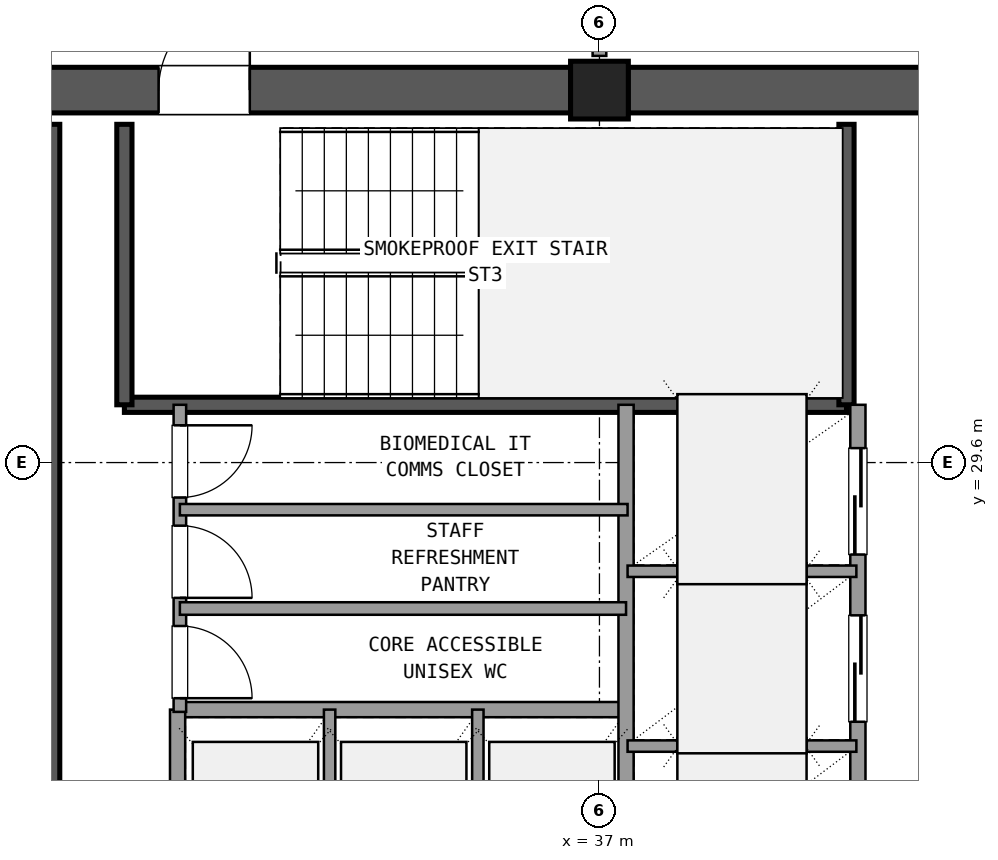
"""IFC4 building model, lengths in metres.
Left out: names, types, materials, properties, quantities, classifications, styles, units other than length and angle.
Written with IfcOpenShell. Run it as: python <this file> out.ifc"""

import sys

from ifc_helpers import new_model, si_unit, direction, frame, frame_2d, origin, origin_2d, place, context, subcontext, project, spatial, rectangle, extrude, element, fill, save


model = new_model("IFC4")
c1 = context("Model", 3, precision=1e-05, world=origin(), true_north=direction((0.0, 1.0)))
c2 = subcontext(c1, "Body", "Model", "MODEL_VIEW")
j1 = project(units=[si_unit("LENGTHUNIT", "METRE"), si_unit("PLANEANGLEUNIT", "RADIAN")], contexts=[c1])
p1 = place(None, origin())
s1 = spatial("IfcSite", under=j1, at=p1, CompositionType="ELEMENT")
p2 = place(p1, origin())
s2 = spatial("IfcBuilding", under=s1, at=p2, CompositionType="ELEMENT")
p3 = place(p2, frame((0.0, 0.0, 271.62)))
s3 = spatial("IfcBuildingStorey", under=s2, at=p3, CompositionType="ELEMENT", Elevation=271.62)
p4 = place(p3, frame((37.0, 34.5, 0.0), z_axis=(0.0, 0.0, 1.0), x_axis=(1.0, 0.0, 0.0)))
e1 = element("IfcColumn", 1, at=p4, inside=s3, PredefinedType="COLUMN", context=c2, shape_type="SweptSolid", body=[
    extrude(rectangle(XDim=0.76, YDim=0.76, at=origin_2d()), origin(), (0.0, 0.0, 1.0), 3.6),
])
p5 = place(p3, frame((47.825, 34.5, 0.0), z_axis=(0.0, 0.0, 1.0), x_axis=(-1.0, 0.0, 0.0)))
e2 = element("IfcWall", 2, at=p5, inside=s3, PredefinedType="SHEAR", context=c2, shape_type="SweptSolid", body=[
    extrude(rectangle(XDim=10.45, YDim=0.6, at=frame_2d((5.225, 0.0))), origin(), (0.0, 0.0, 1.0), 3.32),
])
p6 = place(p5, frame((4.725, 0.0, 0.0)))
e3 = element("IfcOpeningElement", 3, at=p6, cuts=e2, PredefinedType="OPENING", context=c2, shape_type="SweptSolid", body=[
    extrude(rectangle(XDim=1.6, YDim=2.2, at=frame_2d((0.8, 1.1))), frame((0.0, 0.31, 0.0), z_axis=(0.0, -1.0, 0.0), x_axis=(1.0, 0.0, 0.0)), (0.0, 0.0, 1.0), 0.62),
])
p7 = place(p3, frame((36.625, 34.5, 0.0), z_axis=(0.0, 0.0, 1.0), x_axis=(-1.0, 0.0, 0.0)))
e4 = element("IfcWall", 4, at=p7, inside=s3, PredefinedType="SHEAR", context=c2, shape_type="SweptSolid", body=[
    extrude(rectangle(XDim=10.45, YDim=0.6, at=frame_2d((5.225, 0.0))), origin(), (0.0, 0.0, 1.0), 3.32),
])
p8 = place(p7, frame((4.225, 0.0, 0.0)))
e5 = element("IfcOpeningElement", 5, at=p8, cuts=e4, PredefinedType="OPENING", context=c2, shape_type="SweptSolid", body=[
    extrude(rectangle(XDim=1.2, YDim=2.15, at=frame_2d((0.6, 1.075))), frame((0.0, 0.31, 0.0), z_axis=(0.0, -1.0, 0.0), x_axis=(1.0, 0.0, 0.0)), (0.0, 0.0, 1.0), 0.62),
])
p9 = place(p3, frame((29.8, 24.65, 0.0), z_axis=(0.0, 0.0, 1.0), x_axis=(0.0, 1.0, 0.0)))
e6 = element("IfcWall", 6, at=p9, inside=s3, PredefinedType="SHEAR", context=c2, shape_type="SweptSolid", body=[
    extrude(rectangle(XDim=9.4, YDim=0.2, at=frame_2d((4.7, 0.0))), origin(), (0.0, 0.0, 1.0), 3.32),
])
p10 = place(p3, frame((30.75, 30.36, 0.0), z_axis=(0.0, 0.0, 1.0), x_axis=(1.0, 0.0, 0.0)))
e7 = element("IfcWall", 7, at=p10, inside=s3, PredefinedType="SHEAR", context=c2, shape_type="SweptSolid", body=[
    extrude(rectangle(XDim=9.5, YDim=0.2, at=frame_2d((4.75, 0.0))), origin(), (0.0, 0.0, 1.0), 3.32),
])
for number, where, z_axis, x_axis in (
    (8, (30.75, 30.36, 0.0), (0.0, 0.0, 1.0), (0.0, 1.0, 0.0)),
    (9, (40.25, 30.36, 0.0), (0.0, 0.0, 1.0), (0.0, 1.0, 0.0)),
):
    element("IfcWall", number, at=place(p3, frame(where, z_axis=z_axis, x_axis=x_axis)), inside=s3, PredefinedType="SHEAR", context=c2, shape_type="SweptSolid", body=[
        extrude(rectangle(XDim=3.69, YDim=0.2, at=frame_2d((1.845, 0.0))), origin(), (0.0, 0.0, 1.0), 3.32),
    ])
p11 = place(p3, frame((31.45, 26.35, 0.0), z_axis=(0.0, 0.0, 1.0), x_axis=(1.0, 0.0, 0.0)))
e10 = element("IfcWall", 10, at=p11, inside=s3, PredefinedType="SOLIDWALL", context=c2, shape_type="SweptSolid", body=[
    extrude(rectangle(XDim=5.9, YDim=0.2, at=frame_2d((2.95, 0.0))), origin(), (0.0, 0.0, 1.0), 2.61),
])
p12 = place(p3, frame((31.45, 23.54, 0.0), z_axis=(0.0, 0.0, 1.0), x_axis=(0.0, 1.0, 0.0)))
e11 = element("IfcWall", 11, at=p12, inside=s3, PredefinedType="SOLIDWALL", context=c2, shape_type="SweptSolid", body=[
    extrude(rectangle(XDim=2.81, YDim=0.2, at=frame_2d((1.405, 0.0))), origin(), (0.0, 0.0, 1.0), 2.61),
])
for number, where, z_axis, x_axis in (
    (12, (33.45, 23.54, 0.0), (0.0, 0.0, 1.0), (0.0, 1.0, 0.0)),
    (13, (35.4, 23.54, 0.0), (0.0, 0.0, 1.0), (0.0, 1.0, 0.0)),
):
    element("IfcWall", number, at=place(p3, frame(where, z_axis=z_axis, x_axis=x_axis)), inside=s3, PredefinedType="PARTITIONING", context=c2, shape_type="SweptSolid", body=[
        extrude(rectangle(XDim=2.81, YDim=0.15, at=frame_2d((1.405, 0.0))), origin(), (0.0, 0.0, 1.0), 2.61),
    ])
p13 = place(p3, frame((37.35, 23.54, 0.0), z_axis=(0.0, 0.0, 1.0), x_axis=(0.0, 1.0, 0.0)))
e14 = element("IfcWall", 14, at=p13, inside=s3, PredefinedType="SOLIDWALL", context=c2, shape_type="SweptSolid", body=[
    extrude(rectangle(XDim=6.82, YDim=0.2, at=frame_2d((3.41, 0.0))), origin(), (0.0, 0.0, 1.0), 2.61),
])
p14 = place(p3, frame((40.4, 23.54, 0.0), z_axis=(0.0, 0.0, 1.0), x_axis=(0.0, 1.0, 0.0)))
e15 = element("IfcWall", 15, at=p14, inside=s3, PredefinedType="SOLIDWALL", context=c2, shape_type="SweptSolid", body=[
    extrude(rectangle(XDim=6.82, YDim=0.2, at=frame_2d((3.41, 0.0))), origin(), (0.0, 0.0, 1.0), 2.61),
])
p15 = place(p14, frame((0.35, 0.0, 0.0)))
e16 = element("IfcOpeningElement", 16, at=p15, cuts=e15, PredefinedType="OPENING", context=c2, shape_type="SweptSolid", body=[
    extrude(rectangle(XDim=1.4, YDim=2.2, at=frame_2d((0.7, 1.1))), frame((0.0, 0.11, 0.0), z_axis=(0.0, -1.0, 0.0), x_axis=(1.0, 0.0, 0.0)), (0.0, 0.0, 1.0), 0.22),
])
p16 = place(p14, frame((2.65, 0.0, 0.0)))
e17 = element("IfcOpeningElement", 17, at=p16, cuts=e15, PredefinedType="OPENING", context=c2, shape_type="SweptSolid", body=[
    extrude(rectangle(XDim=1.4, YDim=2.2, at=frame_2d((0.7, 1.1))), frame((0.0, 0.11, 0.0), z_axis=(0.0, -1.0, 0.0), x_axis=(1.0, 0.0, 0.0)), (0.0, 0.0, 1.0), 0.22),
])
p17 = place(p14, frame((4.85, 0.0, 0.0)))
e18 = element("IfcOpeningElement", 18, at=p17, cuts=e15, PredefinedType="OPENING", context=c2, shape_type="SweptSolid", body=[
    extrude(rectangle(XDim=1.4, YDim=2.2, at=frame_2d((0.7, 1.1))), frame((0.0, 0.11, 0.0), z_axis=(0.0, -1.0, 0.0), x_axis=(1.0, 0.0, 0.0)), (0.0, 0.0, 1.0), 0.22),
])
for number, where, z_axis, x_axis in (
    (19, (37.37, 25.87, 0.0), (0.0, 0.0, 1.0), (1.0, 0.0, 0.0)),
    (20, (37.37, 28.17, 0.0), (0.0, 0.0, 1.0), (1.0, 0.0, 0.0)),
):
    element("IfcWall", number, at=place(p3, frame(where, z_axis=z_axis, x_axis=x_axis)), inside=s3, PredefinedType="PARTITIONING", context=c2, shape_type="SweptSolid", body=[
        extrude(rectangle(XDim=3.01, YDim=0.15, at=frame_2d((1.505, 0.0))), origin(), (0.0, 0.0, 1.0), 2.61),
    ])
p18 = place(p3, frame((31.48, 26.32, 0.0), z_axis=(0.0, 0.0, 1.0), x_axis=(0.0, 1.0, 0.0)))
e21 = element("IfcWall", 21, at=p18, inside=s3, PredefinedType="PLUMBINGWALL", context=c2, shape_type="SweptSolid", body=[
    extrude(rectangle(XDim=4.04, YDim=0.165, at=frame_2d((2.02, 0.0))), origin(), (0.0, 0.0, 1.0), 2.61),
])
p19 = place(p18, frame((0.18, 0.0, 0.0)))
e22 = element("IfcOpeningElement", 22, at=p19, cuts=e21, PredefinedType="OPENING", context=c2, shape_type="SweptSolid", body=[
    extrude(rectangle(XDim=0.95, YDim=2.1, at=frame_2d((0.475, 1.05))), frame((0.0, 0.093, 0.0), z_axis=(0.0, -1.0, 0.0), x_axis=(1.0, 0.0, 0.0)), (0.0, 0.0, 1.0), 0.185),
])
p20 = place(p18, frame((1.5, 0.0, 0.0)))
e23 = element("IfcOpeningElement", 23, at=p20, cuts=e21, PredefinedType="OPENING", context=c2, shape_type="SweptSolid", body=[
    extrude(rectangle(XDim=0.95, YDim=2.1, at=frame_2d((0.475, 1.05))), frame((0.0, 0.093, 0.0), z_axis=(0.0, -1.0, 0.0), x_axis=(1.0, 0.0, 0.0)), (0.0, 0.0, 1.0), 0.185),
])
p21 = place(p18, frame((2.82, 0.0, 0.0)))
e24 = element("IfcOpeningElement", 24, at=p21, cuts=e21, PredefinedType="OPENING", context=c2, shape_type="SweptSolid", body=[
    extrude(rectangle(XDim=0.95, YDim=2.1, at=frame_2d((0.475, 1.05))), frame((0.0, 0.093, 0.0), z_axis=(0.0, -1.0, 0.0), x_axis=(1.0, 0.0, 0.0)), (0.0, 0.0, 1.0), 0.185),
])
p22 = place(p3, frame((31.48, 27.68, 0.0), z_axis=(0.0, 0.0, 1.0), x_axis=(1.0, 0.0, 0.0)))
e25 = element("IfcWall", 25, at=p22, inside=s3, PredefinedType="PLUMBINGWALL", context=c2, shape_type="SweptSolid", body=[
    extrude(rectangle(XDim=5.87, YDim=0.165, at=frame_2d((2.935, 0.0))), origin(), (0.0, 0.0, 1.0), 2.61),
])
p23 = place(p3, frame((31.48, 28.98, 0.0), z_axis=(0.0, 0.0, 1.0), x_axis=(1.0, 0.0, 0.0)))
e26 = element("IfcWall", 26, at=p23, inside=s3, PredefinedType="PARTITIONING", context=c2, shape_type="SweptSolid", body=[
    extrude(rectangle(XDim=5.89, YDim=0.15, at=frame_2d((2.945, 0.0))), origin(), (0.0, 0.0, 1.0), 2.61),
])
p24 = place(p3, frame((37.0, 34.95, 0.0), z_axis=(0.0, 0.0, 1.0), x_axis=(0.0, 1.0, 0.0)))
e27 = element("IfcWall", 27, at=p24, inside=s3, PredefinedType="PARTITIONING", context=c2, shape_type="SweptSolid", body=[
    extrude(rectangle(XDim=2.7, YDim=0.18, at=frame_2d((1.35, 0.0))), origin(), (0.0, 0.0, 1.0), 2.61),
])
p25 = place(p24, frame((0.35, 0.0, 0.0)))
e28 = element("IfcOpeningElement", 28, at=p25, cuts=e27, PredefinedType="OPENING", context=c2, shape_type="SweptSolid", body=[
    extrude(rectangle(XDim=2.0, YDim=2.2, at=frame_2d((1.0, 1.1))), frame((0.0, 0.1, 0.0), z_axis=(0.0, -1.0, 0.0), x_axis=(1.0, 0.0, 0.0)), (0.0, 0.0, 1.0), 0.2),
])
p26 = place(p8, frame((1.2, 0.0, 0.0), z_axis=(0.0, 0.0, 1.0), x_axis=(-1.0, 0.0, 0.0)))
e29 = element("IfcDoor", 29, at=p26, inside=s3, OperationType="SINGLE_SWING_LEFT", PredefinedType="DOOR", context=c2, shape_type="SweptSolid", body=[
    extrude(rectangle(XDim=1.2, YDim=2.15, at=frame_2d((0.6, 1.075))), frame((0.0, 0.025, 0.0), z_axis=(0.0, -1.0, 0.0), x_axis=(1.0, 0.0, 0.0)), (0.0, 0.0, 1.0), 0.05),
])
fill(e5, e29)
p27 = place(p16, origin())
e30 = element("IfcDoor", 30, at=p27, inside=s3, OperationType="SLIDING_TO_LEFT", PredefinedType="DOOR", context=c2, shape_type="SweptSolid", body=[
    extrude(rectangle(XDim=1.4, YDim=2.2, at=frame_2d((0.7, 1.1))), frame((0.0, 0.025, 0.0), z_axis=(0.0, -1.0, 0.0), x_axis=(1.0, 0.0, 0.0)), (0.0, 0.0, 1.0), 0.05),
])
fill(e17, e30)
p28 = place(p17, origin())
e31 = element("IfcDoor", 31, at=p28, inside=s3, OperationType="SLIDING_TO_RIGHT", PredefinedType="DOOR", context=c2, shape_type="SweptSolid", body=[
    extrude(rectangle(XDim=1.4, YDim=2.2, at=frame_2d((0.7, 1.1))), frame((0.0, 0.025, 0.0), z_axis=(0.0, -1.0, 0.0), x_axis=(1.0, 0.0, 0.0)), (0.0, 0.0, 1.0), 0.05),
])
fill(e18, e31)
p29 = place(p19, frame((0.95, 0.0, 0.0), z_axis=(0.0, 0.0, 1.0), x_axis=(-1.0, 0.0, 0.0)))
e32 = element("IfcDoor", 32, at=p29, inside=s3, OperationType="SINGLE_SWING_LEFT", PredefinedType="DOOR", context=c2, shape_type="SweptSolid", body=[
    extrude(rectangle(XDim=0.95, YDim=2.1, at=frame_2d((0.475, 1.05))), frame((0.0, 0.025, 0.0), z_axis=(0.0, -1.0, 0.0), x_axis=(1.0, 0.0, 0.0)), (0.0, 0.0, 1.0), 0.05),
])
fill(e22, e32)
p30 = place(p20, frame((0.95, 0.0, 0.0), z_axis=(0.0, 0.0, 1.0), x_axis=(-1.0, 0.0, 0.0)))
e33 = element("IfcDoor", 33, at=p30, inside=s3, OperationType="SINGLE_SWING_LEFT", PredefinedType="DOOR", context=c2, shape_type="SweptSolid", body=[
    extrude(rectangle(XDim=0.95, YDim=2.1, at=frame_2d((0.475, 1.05))), frame((0.0, 0.025, 0.0), z_axis=(0.0, -1.0, 0.0), x_axis=(1.0, 0.0, 0.0)), (0.0, 0.0, 1.0), 0.05),
])
fill(e23, e33)
p31 = place(p21, frame((0.95, 0.0, 0.0), z_axis=(0.0, 0.0, 1.0), x_axis=(-1.0, 0.0, 0.0)))
e34 = element("IfcDoor", 34, at=p31, inside=s3, OperationType="SINGLE_SWING_RIGHT", PredefinedType="DOOR", context=c2, shape_type="SweptSolid", body=[
    extrude(rectangle(XDim=0.95, YDim=2.1, at=frame_2d((0.475, 1.05))), frame((0.0, 0.025, 0.0), z_axis=(0.0, -1.0, 0.0), x_axis=(1.0, 0.0, 0.0)), (0.0, 0.0, 1.0), 0.05),
])
fill(e24, e34)
save(model, sys.argv[1])
